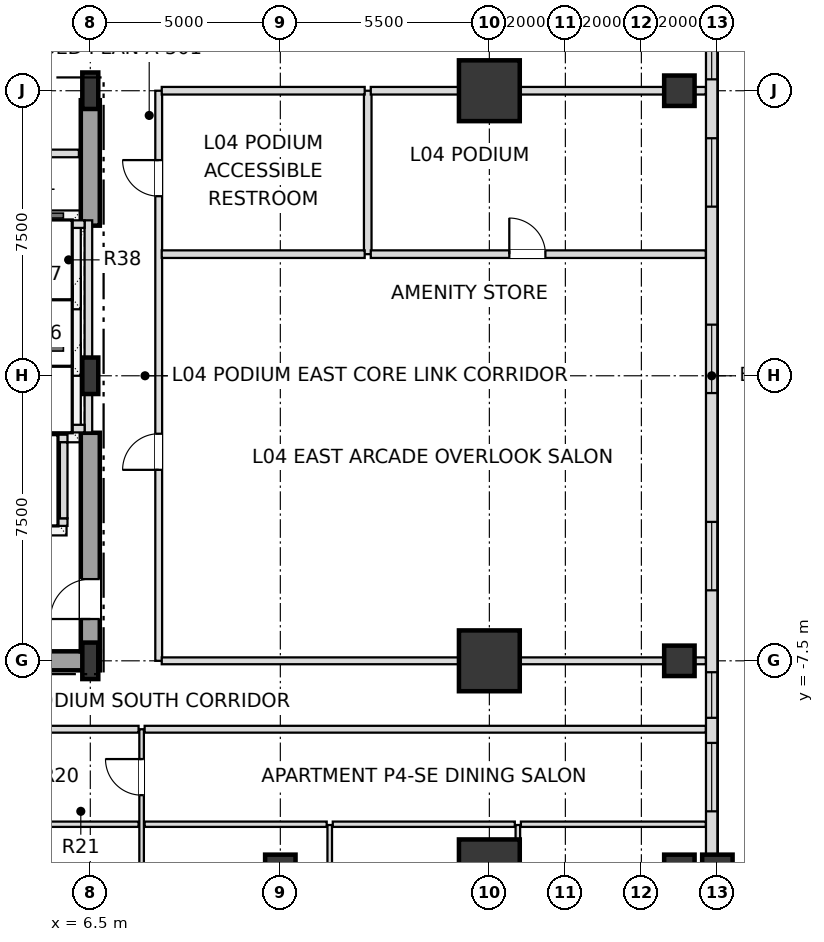
"""IFC4 building model, lengths in metres.
Left out: names, types, materials, properties, quantities, classifications, styles, units other than length and angle.
Written with IfcOpenShell. Run it as: python <this file> out.ifc"""

import sys

from ifc_helpers import new_model, si_unit, direction, frame, frame_2d, origin, origin_2d, place, context, subcontext, project, spatial, rectangle, i_section, extrude, element, fill, save


model = new_model("IFC4")
c1 = context("Model", 3, precision=1e-05, world=origin(), true_north=direction((0.0, 1.0)))
c2 = subcontext(c1, "Body", "Model", "MODEL_VIEW")
j1 = project(units=[si_unit("LENGTHUNIT", "METRE"), si_unit("PLANEANGLEUNIT", "RADIAN")], contexts=[c1])
p1 = place(None, origin())
s1 = spatial("IfcSite", under=j1, at=p1, CompositionType="ELEMENT")
p2 = place(p1, origin())
s2 = spatial("IfcBuilding", under=s1, at=p2, CompositionType="ELEMENT")
p3 = place(p2, frame((0.0, 0.0, 22.2)))
s3 = spatial("IfcBuildingStorey", under=s2, at=p3, CompositionType="ELEMENT", Elevation=22.2)
for number, where, z_axis, x_axis in (
    (1, (6.5, -7.5, 0.0), (0.0, 0.0, 1.0), (1.0, 0.0, 0.0)),
    (2, (6.5, 0.0, 0.0), (0.0, 0.0, 1.0), (1.0, 0.0, 0.0)),
    (3, (6.5, 7.5, 0.0), (0.0, 0.0, 1.0), (1.0, 0.0, 0.0)),
):
    element("IfcColumn", number, at=place(p3, frame(where, z_axis=z_axis, x_axis=x_axis)), inside=s3, PredefinedType="COLUMN", context=c2, shape_type="SweptSolid", body=[
        extrude(i_section(OverallWidth=0.42, OverallDepth=0.96, WebThickness=0.022, FlangeThickness=0.034, at=origin_2d()), origin(), (0.0, 0.0, 1.0), 5.4),
    ])
for number, where, z_axis, x_axis in (
    (4, (17.0, -13.0, 0.0), (0.0, 0.0, 1.0), (1.0, 0.0, 0.0)),
    (5, (17.0, -7.5, 0.0), (0.0, 0.0, 1.0), (1.0, 0.0, 0.0)),
    (6, (17.0, 7.5, 0.0), (0.0, 0.0, 1.0), (1.0, 0.0, 0.0)),
):
    element("IfcColumn", number, at=place(p3, frame(where, z_axis=z_axis, x_axis=x_axis)), inside=s3, PredefinedType="USERDEFINED", context=c2, shape_type="SweptSolid", body=[
        extrude(rectangle(XDim=1.6, YDim=1.6, at=origin_2d()), origin(), (0.0, 0.0, 1.0), 5.4),
    ])
for number, where, z_axis, x_axis in (
    (7, (23.0, -13.0, 0.0), (0.0, 0.0, 1.0), (1.0, 0.0, 0.0)),
    (8, (11.5, -13.0, 0.0), (0.0, 0.0, 1.0), (1.0, 0.0, 0.0)),
    (9, (22.0, -13.0, 0.0), (0.0, 0.0, 1.0), (1.0, 0.0, 0.0)),
    (10, (22.0, -7.5, 0.0), (0.0, 0.0, 1.0), (1.0, 0.0, 0.0)),
    (11, (22.0, 7.5, 0.0), (0.0, 0.0, 1.0), (1.0, 0.0, 0.0)),
):
    element("IfcColumn", number, at=place(p3, frame(where, z_axis=z_axis, x_axis=x_axis)), inside=s3, PredefinedType="COLUMN", context=c2, shape_type="SweptSolid", body=[
        extrude(rectangle(XDim=0.8, YDim=0.8, at=origin_2d()), origin(), (0.0, 0.0, 1.0), 5.4),
    ])
p4 = place(p3, frame((22.85, -16.85, 0.0), z_axis=(0.0, 0.0, 1.0), x_axis=(0.0, 1.0, 0.0)))
e12 = element("IfcWall", 12, at=p4, inside=s3, PredefinedType="SOLIDWALL", context=c2, shape_type="SweptSolid", body=[
    extrude(rectangle(XDim=33.7, YDim=0.3, at=frame_2d((16.85, 0.0))), origin(), (0.0, 0.0, 1.0), 2.985),
])
p5 = place(p4, frame((0.88, 0.0, 0.72)))
e13 = element("IfcOpeningElement", 13, at=p5, cuts=e12, PredefinedType="OPENING", context=c2, shape_type="SweptSolid", body=[
    extrude(rectangle(XDim=1.8, YDim=1.68, at=frame_2d((0.9, 0.84))), frame((0.0, 0.16, 0.0), z_axis=(0.0, -1.0, 0.0), x_axis=(1.0, 0.0, 0.0)), (0.0, 0.0, 1.0), 0.32),
])
p6 = place(p4, frame((5.39, 0.0, 0.72)))
e14 = element("IfcOpeningElement", 14, at=p6, cuts=e12, PredefinedType="OPENING", context=c2, shape_type="SweptSolid", body=[
    extrude(rectangle(XDim=1.8, YDim=1.68, at=frame_2d((0.9, 0.84))), frame((0.0, 0.16, 0.0), z_axis=(0.0, -1.0, 0.0), x_axis=(1.0, 0.0, 0.0)), (0.0, 0.0, 1.0), 0.32),
])
p7 = place(p4, frame((7.85, 0.0, 0.72)))
e15 = element("IfcOpeningElement", 15, at=p7, cuts=e12, PredefinedType="OPENING", context=c2, shape_type="SweptSolid", body=[
    extrude(rectangle(XDim=1.2, YDim=1.68, at=frame_2d((0.6, 0.84))), frame((0.0, 0.16, 0.0), z_axis=(0.0, -1.0, 0.0), x_axis=(1.0, 0.0, 0.0)), (0.0, 0.0, 1.0), 0.32),
])
p8 = place(p4, frame((11.205, 0.0, 0.72)))
e16 = element("IfcOpeningElement", 16, at=p8, cuts=e12, PredefinedType="OPENING", context=c2, shape_type="SweptSolid", body=[
    extrude(rectangle(XDim=1.8, YDim=1.68, at=frame_2d((0.9, 0.84))), frame((0.0, 0.16, 0.0), z_axis=(0.0, -1.0, 0.0), x_axis=(1.0, 0.0, 0.0)), (0.0, 0.0, 1.0), 0.32),
])
p9 = place(p4, frame((16.395, 0.0, 0.72)))
e17 = element("IfcOpeningElement", 17, at=p9, cuts=e12, PredefinedType="OPENING", context=c2, shape_type="SweptSolid", body=[
    extrude(rectangle(XDim=1.8, YDim=1.68, at=frame_2d((0.9, 0.84))), frame((0.0, 0.16, 0.0), z_axis=(0.0, -1.0, 0.0), x_axis=(1.0, 0.0, 0.0)), (0.0, 0.0, 1.0), 0.32),
])
p10 = place(p4, frame((21.3, 0.0, 0.72)))
e18 = element("IfcOpeningElement", 18, at=p10, cuts=e12, PredefinedType="OPENING", context=c2, shape_type="SweptSolid", body=[
    extrude(rectangle(XDim=1.8, YDim=1.68, at=frame_2d((0.9, 0.84))), frame((0.0, 0.16, 0.0), z_axis=(0.0, -1.0, 0.0), x_axis=(1.0, 0.0, 0.0)), (0.0, 0.0, 1.0), 0.32),
])
p11 = place(p4, frame((24.65, 0.0, 0.72)))
e19 = element("IfcOpeningElement", 19, at=p11, cuts=e12, PredefinedType="OPENING", context=c2, shape_type="SweptSolid", body=[
    extrude(rectangle(XDim=1.2, YDim=1.68, at=frame_2d((0.6, 0.84))), frame((0.0, 0.16, 0.0), z_axis=(0.0, -1.0, 0.0), x_axis=(1.0, 0.0, 0.0)), (0.0, 0.0, 1.0), 0.32),
])
p12 = place(p4, frame((26.88, 0.0, 0.72)))
e20 = element("IfcOpeningElement", 20, at=p12, cuts=e12, PredefinedType="OPENING", context=c2, shape_type="SweptSolid", body=[
    extrude(rectangle(XDim=1.8, YDim=1.68, at=frame_2d((0.9, 0.84))), frame((0.0, 0.16, 0.0), z_axis=(0.0, -1.0, 0.0), x_axis=(1.0, 0.0, 0.0)), (0.0, 0.0, 1.0), 0.32),
])
p13 = place(p4, frame((31.02, 0.0, 0.72)))
e21 = element("IfcOpeningElement", 21, at=p13, cuts=e12, PredefinedType="OPENING", context=c2, shape_type="SweptSolid", body=[
    extrude(rectangle(XDim=1.8, YDim=1.68, at=frame_2d((0.9, 0.84))), frame((0.0, 0.16, 0.0), z_axis=(0.0, -1.0, 0.0), x_axis=(1.0, 0.0, 0.0)), (0.0, 0.0, 1.0), 0.32),
])
p14 = place(p3, frame((0.0, -7.5, 0.0), z_axis=(0.0, 0.0, 1.0), x_axis=(1.0, 0.0, 0.0)))
e22 = element("IfcWall", 22, at=p14, inside=s3, PredefinedType="SHEAR", context=c2, shape_type="SweptSolid", body=[
    extrude(rectangle(XDim=6.75, YDim=0.5, at=frame_2d((3.375, 0.0))), origin(), (0.0, 0.0, 1.0), 5.0),
])
p15 = place(p3, frame((6.5, -7.25, 0.0), z_axis=(0.0, 0.0, 1.0), x_axis=(0.0, 1.0, 0.0)))
e23 = element("IfcWall", 23, at=p15, inside=s3, PredefinedType="SHEAR", context=c2, shape_type="SweptSolid", body=[
    extrude(rectangle(XDim=5.75, YDim=0.5, at=frame_2d((2.875, 0.0))), origin(), (0.0, 0.0, 1.0), 5.0),
])
p16 = place(p15, frame((0.85, 0.0, 0.0)))
e24 = element("IfcOpeningElement", 24, at=p16, cuts=e23, PredefinedType="OPENING", context=c2, shape_type="SweptSolid", body=[
    extrude(rectangle(XDim=1.05, YDim=2.15, at=frame_2d((0.525, 1.075))), frame((0.0, 0.26, 0.0), z_axis=(0.0, -1.0, 0.0), x_axis=(1.0, 0.0, 0.0)), (0.0, 0.0, 1.0), 0.52),
])
p17 = place(p3, frame((6.5, 3.95, 0.0), z_axis=(0.0, 0.0, 1.0), x_axis=(0.0, 1.0, 0.0)))
e25 = element("IfcWall", 25, at=p17, inside=s3, PredefinedType="SHEAR", context=c2, shape_type="SweptSolid", body=[
    extrude(rectangle(XDim=3.3, YDim=0.5, at=frame_2d((1.65, 0.0))), origin(), (0.0, 0.0, 1.0), 5.0),
])
p18 = place(p3, frame((6.45, -1.49, 0.0), z_axis=(0.0, 0.0, 1.0), x_axis=(0.0, 1.0, 0.0)))
e26 = element("IfcWall", 26, at=p18, inside=s3, PredefinedType="SOLIDWALL", context=c2, shape_type="SweptSolid", body=[
    extrude(rectangle(XDim=5.58, YDim=0.2, at=frame_2d((2.79, 0.0))), origin(), (0.0, 0.0, 1.0), 4.436),
])
for number, where, z_axis, x_axis in (
    (27, (4.15, -1.39, 0.0), (0.0, 0.0, 1.0), (1.0, 0.0, 0.0)),
    (28, (4.15, 3.99, 0.0), (0.0, 0.0, 1.0), (1.0, 0.0, 0.0)),
):
    element("IfcWall", number, at=place(p3, frame(where, z_axis=z_axis, x_axis=x_axis)), inside=s3, PredefinedType="SOLIDWALL", context=c2, shape_type="SweptSolid", body=[
        extrude(rectangle(XDim=2.2, YDim=0.2, at=frame_2d((1.1, 0.0))), origin(), (0.0, 0.0, 1.0), 5.0),
    ])
p19 = place(p3, frame((1.8, -3.85, 0.0), z_axis=(0.0, 0.0, 1.0), x_axis=(1.0, 0.0, 0.0)))
e29 = element("IfcWall", 29, at=p19, inside=s3, PredefinedType="SOLIDWALL", context=c2, shape_type="SweptSolid", body=[
    extrude(rectangle(XDim=4.1, YDim=0.2, at=frame_2d((2.05, 0.0))), origin(), (0.0, 0.0, 1.0), 5.0),
])
p20 = place(p19, frame((0.45, 0.0, 0.0)))
e30 = element("IfcOpeningElement", 30, at=p20, cuts=e29, PredefinedType="OPENING", context=c2, shape_type="SweptSolid", body=[
    extrude(rectangle(XDim=1.2, YDim=2.2, at=frame_2d((0.6, 1.1))), frame((0.0, 0.11, 0.0), z_axis=(0.0, -1.0, 0.0), x_axis=(1.0, 0.0, 0.0)), (0.0, 0.0, 1.0), 0.22),
])
p21 = place(p19, frame((2.45, 0.0, 0.0)))
e31 = element("IfcOpeningElement", 31, at=p21, cuts=e29, PredefinedType="OPENING", context=c2, shape_type="SweptSolid", body=[
    extrude(rectangle(XDim=1.2, YDim=2.2, at=frame_2d((0.6, 1.1))), frame((0.0, 0.11, 0.0), z_axis=(0.0, -1.0, 0.0), x_axis=(1.0, 0.0, 0.0)), (0.0, 0.0, 1.0), 0.22),
])
p22 = place(p3, frame((1.8, -1.65, 0.0), z_axis=(0.0, 0.0, 1.0), x_axis=(1.0, 0.0, 0.0)))
e32 = element("IfcWall", 32, at=p22, inside=s3, PredefinedType="SOLIDWALL", context=c2, shape_type="SweptSolid", body=[
    extrude(rectangle(XDim=4.1, YDim=0.2, at=frame_2d((2.05, 0.0))), origin(), (0.0, 0.0, 1.0), 5.0),
])
p23 = place(p3, frame((5.8, -3.75, 0.0), z_axis=(0.0, 0.0, 1.0), x_axis=(0.0, 1.0, 0.0)))
e33 = element("IfcWall", 33, at=p23, inside=s3, PredefinedType="SOLIDWALL", context=c2, shape_type="SweptSolid", body=[
    extrude(rectangle(XDim=2.0, YDim=0.2, at=frame_2d((1.0, 0.0))), origin(), (0.0, 0.0, 1.0), 5.0),
])
p24 = place(p3, frame((7.85, -16.695, 0.0), z_axis=(0.0, 0.0, 1.0), x_axis=(0.0, 1.0, 0.0)))
e34 = element("IfcWall", 34, at=p24, inside=s3, PredefinedType="PARTITIONING", context=c2, shape_type="SweptSolid", body=[
    extrude(rectangle(XDim=7.395, YDim=0.12, at=frame_2d((3.698, 0.0))), origin(), (0.0, 0.0, 1.0), 4.436),
])
p25 = place(p24, frame((5.66, 0.0, 0.0)))
e35 = element("IfcOpeningElement", 35, at=p25, cuts=e34, PredefinedType="OPENING", context=c2, shape_type="SweptSolid", body=[
    extrude(rectangle(XDim=0.95, YDim=2.1, at=frame_2d((0.475, 1.05))), frame((0.0, 0.07, 0.0), z_axis=(0.0, -1.0, 0.0), x_axis=(1.0, 0.0, 0.0)), (0.0, 0.0, 1.0), 0.14),
])
p26 = place(p24, frame((1.985, 0.0, 0.0)))
e36 = element("IfcOpeningElement", 36, at=p26, cuts=e34, PredefinedType="OPENING", context=c2, shape_type="SweptSolid", body=[
    extrude(rectangle(XDim=0.9, YDim=2.1, at=frame_2d((0.45, 1.05))), frame((0.0, 0.07, 0.0), z_axis=(0.0, -1.0, 0.0), x_axis=(1.0, 0.0, 0.0)), (0.0, 0.0, 1.0), 0.14),
])
p27 = place(p3, frame((8.3, -7.5, 0.0), z_axis=(0.0, 0.0, 1.0), x_axis=(0.0, 1.0, 0.0)))
e37 = element("IfcWall", 37, at=p27, inside=s3, PredefinedType="PARTITIONING", context=c2, shape_type="SweptSolid", body=[
    extrude(rectangle(XDim=15.0, YDim=0.18, at=frame_2d((7.5, 0.0))), origin(), (0.0, 0.0, 1.0), 5.0),
])
p28 = place(p27, frame((5.025, 0.0, 0.0)))
e38 = element("IfcOpeningElement", 38, at=p28, cuts=e37, PredefinedType="OPENING", context=c2, shape_type="SweptSolid", body=[
    extrude(rectangle(XDim=0.95, YDim=2.15, at=frame_2d((0.475, 1.075))), frame((0.0, 0.1, 0.0), z_axis=(0.0, -1.0, 0.0), x_axis=(1.0, 0.0, 0.0)), (0.0, 0.0, 1.0), 0.2),
])
p29 = place(p27, frame((12.225, 0.0, 0.0)))
e39 = element("IfcOpeningElement", 39, at=p29, cuts=e37, PredefinedType="OPENING", context=c2, shape_type="SweptSolid", body=[
    extrude(rectangle(XDim=0.95, YDim=2.15, at=frame_2d((0.475, 1.075))), frame((0.0, 0.1, 0.0), z_axis=(0.0, -1.0, 0.0), x_axis=(1.0, 0.0, 0.0)), (0.0, 0.0, 1.0), 0.2),
])
p30 = place(p3, frame((12.8, -16.695, 0.0), z_axis=(0.0, 0.0, 1.0), x_axis=(0.0, 1.0, 0.0)))
e40 = element("IfcWall", 40, at=p30, inside=s3, PredefinedType="PARTITIONING", context=c2, shape_type="SweptSolid", body=[
    extrude(rectangle(XDim=4.875, YDim=0.12, at=frame_2d((2.438, 0.0))), origin(), (0.0, 0.0, 1.0), 4.356),
])
p31 = place(p30, frame((1.985, 0.0, 0.0)))
e41 = element("IfcOpeningElement", 41, at=p31, cuts=e40, PredefinedType="OPENING", context=c2, shape_type="SweptSolid", body=[
    extrude(rectangle(XDim=0.9, YDim=2.1, at=frame_2d((0.45, 1.05))), frame((0.0, 0.07, 0.0), z_axis=(0.0, -1.0, 0.0), x_axis=(1.0, 0.0, 0.0)), (0.0, 0.0, 1.0), 0.14),
])
p32 = place(p3, frame((13.8, 3.2, 0.0), z_axis=(0.0, 0.0, 1.0), x_axis=(0.0, 1.0, 0.0)))
e42 = element("IfcWall", 42, at=p32, inside=s3, PredefinedType="SOLIDWALL", context=c2, shape_type="SweptSolid", body=[
    extrude(rectangle(XDim=4.3, YDim=0.2, at=frame_2d((2.15, 0.0))), origin(), (0.0, 0.0, 1.0), 5.0),
])
p33 = place(p3, frame((17.75, -16.695, 0.0), z_axis=(0.0, 0.0, 1.0), x_axis=(0.0, 1.0, 0.0)))
e43 = element("IfcWall", 43, at=p33, inside=s3, PredefinedType="PARTITIONING", context=c2, shape_type="SweptSolid", body=[
    extrude(rectangle(XDim=4.875, YDim=0.12, at=frame_2d((2.438, 0.0))), origin(), (0.0, 0.0, 1.0), 2.985),
])
p34 = place(p33, frame((1.721, 0.0, 0.0)))
e44 = element("IfcOpeningElement", 44, at=p34, cuts=e43, PredefinedType="OPENING", context=c2, shape_type="SweptSolid", body=[
    extrude(rectangle(XDim=0.9, YDim=2.1, at=frame_2d((0.45, 1.05))), frame((0.0, 0.07, 0.0), z_axis=(0.0, -1.0, 0.0), x_axis=(1.0, 0.0, 0.0)), (0.0, 0.0, 1.0), 0.14),
])
p35 = place(p3, frame((4.73, -11.8, 0.0), z_axis=(0.0, 0.0, 1.0), x_axis=(1.0, 0.0, 0.0)))
e45 = element("IfcWall", 45, at=p35, inside=s3, PredefinedType="PARTITIONING", context=c2, shape_type="SweptSolid", body=[
    extrude(rectangle(XDim=3.04, YDim=0.14, at=frame_2d((1.52, 0.0))), origin(), (0.0, 0.0, 1.0), 4.436),
])
p36 = place(p3, frame((7.93, -11.8, 0.0), z_axis=(0.0, 0.0, 1.0), x_axis=(1.0, 0.0, 0.0)))
e46 = element("IfcWall", 46, at=p36, inside=s3, PredefinedType="PARTITIONING", context=c2, shape_type="SweptSolid", body=[
    extrude(rectangle(XDim=4.79, YDim=0.14, at=frame_2d((2.395, 0.0))), origin(), (0.0, 0.0, 1.0), 5.0),
])
p37 = place(p3, frame((12.88, -11.8, 0.0), z_axis=(0.0, 0.0, 1.0), x_axis=(1.0, 0.0, 0.0)))
e47 = element("IfcWall", 47, at=p37, inside=s3, PredefinedType="PARTITIONING", context=c2, shape_type="SweptSolid", body=[
    extrude(rectangle(XDim=4.79, YDim=0.14, at=frame_2d((2.395, 0.0))), origin(), (0.0, 0.0, 1.0), 4.436),
])
p38 = place(p3, frame((17.83, -11.8, 0.0), z_axis=(0.0, 0.0, 1.0), x_axis=(1.0, 0.0, 0.0)))
e48 = element("IfcWall", 48, at=p38, inside=s3, PredefinedType="PARTITIONING", context=c2, shape_type="SweptSolid", body=[
    extrude(rectangle(XDim=4.865, YDim=0.14, at=frame_2d((2.433, 0.0))), origin(), (0.0, 0.0, 1.0), 4.356),
])
p39 = place(p3, frame((4.73, -9.3, 0.0), z_axis=(0.0, 0.0, 1.0), x_axis=(1.0, 0.0, 0.0)))
e49 = element("IfcWall", 49, at=p39, inside=s3, PredefinedType="PARTITIONING", context=c2, shape_type="SweptSolid", body=[
    extrude(rectangle(XDim=3.04, YDim=0.18, at=frame_2d((1.52, 0.0))), origin(), (0.0, 0.0, 1.0), 4.436),
])
p40 = place(p3, frame((7.93, -9.3, 0.0), z_axis=(0.0, 0.0, 1.0), x_axis=(1.0, 0.0, 0.0)))
e50 = element("IfcWall", 50, at=p40, inside=s3, PredefinedType="PARTITIONING", context=c2, shape_type="SweptSolid", body=[
    extrude(rectangle(XDim=14.765, YDim=0.18, at=frame_2d((7.383, 0.0))), origin(), (0.0, 0.0, 1.0), 4.356),
])
p41 = place(p3, frame((8.38, -7.5, 0.0), z_axis=(0.0, 0.0, 1.0), x_axis=(1.0, 0.0, 0.0)))
e51 = element("IfcWall", 51, at=p41, inside=s3, PredefinedType="PARTITIONING", context=c2, shape_type="SweptSolid", body=[
    extrude(rectangle(XDim=14.315, YDim=0.18, at=frame_2d((7.158, 0.0))), origin(), (0.0, 0.0, 1.0), 4.356),
])
p42 = place(p3, frame((8.38, 3.2, 0.0), z_axis=(0.0, 0.0, 1.0), x_axis=(1.0, 0.0, 0.0)))
e52 = element("IfcWall", 52, at=p42, inside=s3, PredefinedType="SOLIDWALL", context=c2, shape_type="SweptSolid", body=[
    extrude(rectangle(XDim=5.34, YDim=0.2, at=frame_2d((2.67, 0.0))), origin(), (0.0, 0.0, 1.0), 4.568),
])
p43 = place(p3, frame((13.88, 3.2, 0.0), z_axis=(0.0, 0.0, 1.0), x_axis=(1.0, 0.0, 0.0)))
e53 = element("IfcWall", 53, at=p43, inside=s3, PredefinedType="SOLIDWALL", context=c2, shape_type="SweptSolid", body=[
    extrude(rectangle(XDim=8.815, YDim=0.2, at=frame_2d((4.408, 0.0))), origin(), (0.0, 0.0, 1.0), 4.356),
])
p44 = place(p43, frame((3.645, 0.0, 0.0)))
e54 = element("IfcOpeningElement", 54, at=p44, cuts=e53, PredefinedType="OPENING", context=c2, shape_type="SweptSolid", body=[
    extrude(rectangle(XDim=0.95, YDim=2.15, at=frame_2d((0.475, 1.075))), frame((0.0, 0.11, 0.0), z_axis=(0.0, -1.0, 0.0), x_axis=(1.0, 0.0, 0.0)), (0.0, 0.0, 1.0), 0.22),
])
p45 = place(p3, frame((4.13, 5.85, 0.0), z_axis=(0.0, 0.0, 1.0), x_axis=(1.0, 0.0, 0.0)))
e55 = element("IfcWall", 55, at=p45, inside=s3, PredefinedType="SOLIDWALL", context=c2, shape_type="SweptSolid", body=[
    extrude(rectangle(XDim=2.07, YDim=0.2, at=frame_2d((1.035, 0.0))), origin(), (0.0, 0.0, 1.0), 5.0),
])
p46 = place(p3, frame((8.38, 7.5, 0.0), z_axis=(0.0, 0.0, 1.0), x_axis=(1.0, 0.0, 0.0)))
e56 = element("IfcWall", 56, at=p46, inside=s3, PredefinedType="SOLIDWALL", context=c2, shape_type="SweptSolid", body=[
    extrude(rectangle(XDim=5.34, YDim=0.2, at=frame_2d((2.67, 0.0))), origin(), (0.0, 0.0, 1.0), 4.436),
])
p47 = place(p3, frame((13.88, 7.5, 0.0), z_axis=(0.0, 0.0, 1.0), x_axis=(1.0, 0.0, 0.0)))
e57 = element("IfcWall", 57, at=p47, inside=s3, PredefinedType="SOLIDWALL", context=c2, shape_type="SweptSolid", body=[
    extrude(rectangle(XDim=8.815, YDim=0.2, at=frame_2d((4.408, 0.0))), origin(), (0.0, 0.0, 1.0), 4.356),
])
p48 = place(p6, origin())
e58 = element("IfcWindow", 58, at=p48, inside=s3, PartitioningType="SINGLE_PANEL", PredefinedType="WINDOW", context=c2, shape_type="SweptSolid", body=[
    extrude(rectangle(XDim=1.8, YDim=1.68, at=frame_2d((0.9, 0.84))), frame((0.0, 0.03, 0.0), z_axis=(0.0, -1.0, 0.0), x_axis=(1.0, 0.0, 0.0)), (0.0, 0.0, 1.0), 0.06),
])
fill(e14, e58)
p49 = place(p7, origin())
e59 = element("IfcWindow", 59, at=p49, inside=s3, PartitioningType="SINGLE_PANEL", PredefinedType="WINDOW", context=c2, shape_type="SweptSolid", body=[
    extrude(rectangle(XDim=1.2, YDim=1.68, at=frame_2d((0.6, 0.84))), frame((0.0, 0.03, 0.0), z_axis=(0.0, -1.0, 0.0), x_axis=(1.0, 0.0, 0.0)), (0.0, 0.0, 1.0), 0.06),
])
fill(e15, e59)
p50 = place(p8, origin())
e60 = element("IfcWindow", 60, at=p50, inside=s3, PartitioningType="SINGLE_PANEL", PredefinedType="WINDOW", context=c2, shape_type="SweptSolid", body=[
    extrude(rectangle(XDim=1.8, YDim=1.68, at=frame_2d((0.9, 0.84))), frame((0.0, 0.03, 0.0), z_axis=(0.0, -1.0, 0.0), x_axis=(1.0, 0.0, 0.0)), (0.0, 0.0, 1.0), 0.06),
])
fill(e16, e60)
p51 = place(p9, origin())
e61 = element("IfcWindow", 61, at=p51, inside=s3, PartitioningType="SINGLE_PANEL", PredefinedType="WINDOW", context=c2, shape_type="SweptSolid", body=[
    extrude(rectangle(XDim=1.8, YDim=1.68, at=frame_2d((0.9, 0.84))), frame((0.0, 0.03, 0.0), z_axis=(0.0, -1.0, 0.0), x_axis=(1.0, 0.0, 0.0)), (0.0, 0.0, 1.0), 0.06),
])
fill(e17, e61)
p52 = place(p10, origin())
e62 = element("IfcWindow", 62, at=p52, inside=s3, PartitioningType="SINGLE_PANEL", PredefinedType="WINDOW", context=c2, shape_type="SweptSolid", body=[
    extrude(rectangle(XDim=1.8, YDim=1.68, at=frame_2d((0.9, 0.84))), frame((0.0, 0.03, 0.0), z_axis=(0.0, -1.0, 0.0), x_axis=(1.0, 0.0, 0.0)), (0.0, 0.0, 1.0), 0.06),
])
fill(e18, e62)
p53 = place(p11, origin())
e63 = element("IfcWindow", 63, at=p53, inside=s3, PartitioningType="SINGLE_PANEL", PredefinedType="WINDOW", context=c2, shape_type="SweptSolid", body=[
    extrude(rectangle(XDim=1.2, YDim=1.68, at=frame_2d((0.6, 0.84))), frame((0.0, 0.03, 0.0), z_axis=(0.0, -1.0, 0.0), x_axis=(1.0, 0.0, 0.0)), (0.0, 0.0, 1.0), 0.06),
])
fill(e19, e63)
p54 = place(p16, origin())
e64 = element("IfcDoor", 64, at=p54, inside=s3, OperationType="SINGLE_SWING_LEFT", PredefinedType="DOOR", context=c2, shape_type="SweptSolid", body=[
    extrude(rectangle(XDim=1.05, YDim=2.15, at=frame_2d((0.525, 1.075))), frame((0.0, 0.025, 0.0), z_axis=(0.0, -1.0, 0.0), x_axis=(1.0, 0.0, 0.0)), (0.0, 0.0, 1.0), 0.05),
])
fill(e24, e64)
p55 = place(p25, origin())
e65 = element("IfcDoor", 65, at=p55, inside=s3, OperationType="SINGLE_SWING_RIGHT", PredefinedType="DOOR", context=c2, shape_type="SweptSolid", body=[
    extrude(rectangle(XDim=0.95, YDim=2.1, at=frame_2d((0.475, 1.05))), frame((0.0, 0.025, 0.0), z_axis=(0.0, -1.0, 0.0), x_axis=(1.0, 0.0, 0.0)), (0.0, 0.0, 1.0), 0.05),
])
fill(e35, e65)
p56 = place(p28, origin())
e66 = element("IfcDoor", 66, at=p56, inside=s3, OperationType="SINGLE_SWING_LEFT", PredefinedType="DOOR", context=c2, shape_type="SweptSolid", body=[
    extrude(rectangle(XDim=0.95, YDim=2.15, at=frame_2d((0.475, 1.075))), frame((0.0, 0.025, 0.0), z_axis=(0.0, -1.0, 0.0), x_axis=(1.0, 0.0, 0.0)), (0.0, 0.0, 1.0), 0.05),
])
fill(e38, e66)
p57 = place(p29, origin())
e67 = element("IfcDoor", 67, at=p57, inside=s3, OperationType="SINGLE_SWING_RIGHT", PredefinedType="DOOR", context=c2, shape_type="SweptSolid", body=[
    extrude(rectangle(XDim=0.95, YDim=2.15, at=frame_2d((0.475, 1.075))), frame((0.0, 0.025, 0.0), z_axis=(0.0, -1.0, 0.0), x_axis=(1.0, 0.0, 0.0)), (0.0, 0.0, 1.0), 0.05),
])
fill(e39, e67)
p58 = place(p44, origin())
e68 = element("IfcDoor", 68, at=p58, inside=s3, OperationType="SINGLE_SWING_LEFT", PredefinedType="DOOR", context=c2, shape_type="SweptSolid", body=[
    extrude(rectangle(XDim=0.95, YDim=2.15, at=frame_2d((0.475, 1.075))), frame((0.0, 0.025, 0.0), z_axis=(0.0, -1.0, 0.0), x_axis=(1.0, 0.0, 0.0)), (0.0, 0.0, 1.0), 0.05),
])
fill(e54, e68)
save(model, sys.argv[1])
